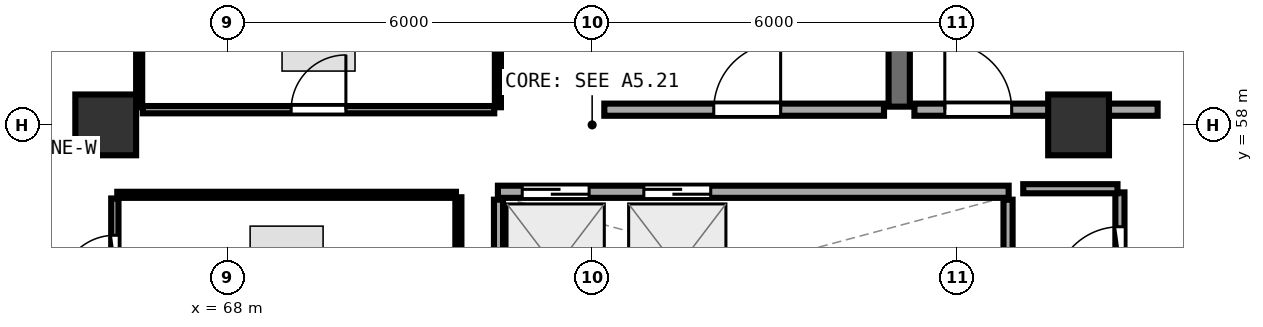
"""IFC4 building model, lengths in metres.
Left out: names, types, materials, properties, quantities, classifications, styles, units other than length and angle.
Written with IfcOpenShell. Run it as: python <this file> out.ifc"""

import sys

from ifc_helpers import new_model, si_unit, direction, frame, frame_2d, origin, origin_2d, place, context, subcontext, project, spatial, rectangle, extrude, element, fill, save


model = new_model("IFC4")
c1 = context("Model", 3, precision=1e-05, world=origin(), true_north=direction((0.0, 1.0)))
c2 = subcontext(c1, "Body", "Model", "MODEL_VIEW")
j1 = project(units=[si_unit("LENGTHUNIT", "METRE"), si_unit("PLANEANGLEUNIT", "RADIAN")], contexts=[c1])
p1 = place(None, origin())
s1 = spatial("IfcSite", under=j1, at=p1, CompositionType="ELEMENT")
p2 = place(p1, origin())
s2 = spatial("IfcBuilding", under=s1, at=p2, CompositionType="ELEMENT")
p3 = place(p2, frame((0.0, 0.0, 256.2)))
s3 = spatial("IfcBuildingStorey", under=s2, at=p3, CompositionType="ELEMENT", Elevation=256.2)
for number, where, z_axis, x_axis in (
    (1, (82.0, 58.0, 0.0), (0.0, 0.0, 1.0), (1.0, 0.0, 0.0)),
    (2, (66.0, 58.0, 0.0), (0.0, 0.0, 1.0), (1.0, 0.0, 0.0)),
):
    element("IfcColumn", number, at=place(p3, frame(where, z_axis=z_axis, x_axis=x_axis)), inside=s3, PredefinedType="PILASTER", context=c2, shape_type="SweptSolid", body=[
        extrude(rectangle(XDim=1.0, YDim=1.0, at=origin_2d()), origin(), (0.0, 0.0, 1.0), 3.75),
    ])
p4 = place(p3, frame((79.05, 58.3, 0.0), z_axis=(0.0, 0.0, 1.0), x_axis=(0.0, 1.0, 0.0)))
e3 = element("IfcWall", 3, at=p4, inside=s3, PredefinedType="SHEAR", context=c2, shape_type="SweptSolid", body=[
    extrude(rectangle(XDim=6.3, YDim=0.35, at=frame_2d((3.15, 0.0))), origin(), (0.0, 0.0, 1.0), 3.49),
])
p5 = place(p3, frame((74.2, 58.25, 0.0), z_axis=(0.0, 0.0, 1.0), x_axis=(1.0, 0.0, 0.0)))
e4 = element("IfcWall", 4, at=p5, inside=s3, PredefinedType="SOLIDWALL", context=c2, shape_type="SweptSolid", body=[
    extrude(rectangle(XDim=4.6, YDim=0.2, at=frame_2d((2.3, 0.0))), origin(), (0.0, 0.0, 1.0), 3.48),
])
p6 = place(p5, frame((1.8, 0.0, 0.0)))
e5 = element("IfcOpeningElement", 5, at=p6, cuts=e4, PredefinedType="OPENING", context=c2, shape_type="SweptSolid", body=[
    extrude(rectangle(XDim=1.1, YDim=2.1, at=frame_2d((0.55, 1.05))), frame((0.0, 0.11, 0.0), z_axis=(0.0, -1.0, 0.0), x_axis=(1.0, 0.0, 0.0)), (0.0, 0.0, 1.0), 0.22),
])
p7 = place(p3, frame((79.3, 58.25, 0.0), z_axis=(0.0, 0.0, 1.0), x_axis=(1.0, 0.0, 0.0)))
e6 = element("IfcWall", 6, at=p7, inside=s3, PredefinedType="SOLIDWALL", context=c2, shape_type="SweptSolid", body=[
    extrude(rectangle(XDim=4.0, YDim=0.2, at=frame_2d((2.0, 0.0))), origin(), (0.0, 0.0, 1.0), 2.775),
])
p8 = place(p7, frame((0.5, 0.0, 0.0)))
e7 = element("IfcOpeningElement", 7, at=p8, cuts=e6, PredefinedType="OPENING", context=c2, shape_type="SweptSolid", body=[
    extrude(rectangle(XDim=1.1, YDim=2.1, at=frame_2d((0.55, 1.05))), frame((0.0, 0.11, 0.0), z_axis=(0.0, -1.0, 0.0), x_axis=(1.0, 0.0, 0.0)), (0.0, 0.0, 1.0), 0.22),
])
p9 = place(p3, frame((72.45, 56.9, 0.0), z_axis=(0.0, 0.0, 1.0), x_axis=(1.0, 0.0, 0.0)))
e8 = element("IfcWall", 8, at=p9, inside=s3, PredefinedType="SOLIDWALL", context=c2, shape_type="SweptSolid", body=[
    extrude(rectangle(XDim=8.4, YDim=0.2, at=frame_2d((4.2, 0.0))), origin(), (0.0, 0.0, 1.0), 3.48),
])
p10 = place(p9, frame((0.4, 0.0, 0.0)))
e9 = element("IfcOpeningElement", 9, at=p10, cuts=e8, PredefinedType="OPENING", context=c2, shape_type="SweptSolid", body=[
    extrude(rectangle(XDim=1.1, YDim=2.1, at=frame_2d((0.55, 1.05))), frame((0.0, 0.11, 0.0), z_axis=(0.0, -1.0, 0.0), x_axis=(1.0, 0.0, 0.0)), (0.0, 0.0, 1.0), 0.22),
])
p11 = place(p9, frame((2.4, 0.0, 0.0)))
e10 = element("IfcOpeningElement", 10, at=p11, cuts=e8, PredefinedType="OPENING", context=c2, shape_type="SweptSolid", body=[
    extrude(rectangle(XDim=1.1, YDim=2.1, at=frame_2d((0.55, 1.05))), frame((0.0, 0.11, 0.0), z_axis=(0.0, -1.0, 0.0), x_axis=(1.0, 0.0, 0.0)), (0.0, 0.0, 1.0), 0.22),
])
for number, where, z_axis, x_axis in (
    (11, (72.46, 54.48, 0.0), (0.0, 0.0, 1.0), (0.0, 1.0, 0.0)),
    (12, (80.84, 54.48, 0.0), (0.0, 0.0, 1.0), (0.0, 1.0, 0.0)),
):
    element("IfcWall", number, at=place(p3, frame(where, z_axis=z_axis, x_axis=x_axis)), inside=s3, PredefinedType="PARTITIONING", context=c2, shape_type="SweptSolid", body=[
        extrude(rectangle(XDim=2.29, YDim=0.15, at=frame_2d((1.145, 0.0))), origin(), (0.0, 0.0, 1.0), 3.48),
    ])
p12 = place(p3, frame((82.68, 54.68, 0.0), z_axis=(0.0, 0.0, 1.0), x_axis=(0.0, 1.0, 0.0)))
e13 = element("IfcWall", 13, at=p12, inside=s3, PredefinedType="PARTITIONING", context=c2, shape_type="SweptSolid", body=[
    extrude(rectangle(XDim=2.21, YDim=0.15, at=frame_2d((1.105, 0.0))), origin(), (0.0, 0.0, 1.0), 3.48),
])
p13 = place(p12, frame((0.565, 0.0, 0.0)))
e14 = element("IfcOpeningElement", 14, at=p13, cuts=e13, PredefinedType="OPENING", context=c2, shape_type="SweptSolid", body=[
    extrude(rectangle(XDim=1.08, YDim=2.1, at=frame_2d((0.54, 1.05))), frame((0.0, 0.085, 0.0), z_axis=(0.0, -1.0, 0.0), x_axis=(1.0, 0.0, 0.0)), (0.0, 0.0, 1.0), 0.17),
])
p14 = place(p3, frame((66.61, 58.25, 0.0), z_axis=(0.0, 0.0, 1.0), x_axis=(1.0, 0.0, 0.0)))
e15 = element("IfcWall", 15, at=p14, inside=s3, PredefinedType="PARTITIONING", context=c2, shape_type="SweptSolid", body=[
    extrude(rectangle(XDim=5.78, YDim=0.12, at=frame_2d((2.89, 0.0))), origin(), (0.0, 0.0, 1.0), 3.48),
])
p15 = place(p14, frame((2.44, 0.0, 0.0)))
e16 = element("IfcOpeningElement", 16, at=p15, cuts=e15, PredefinedType="OPENING", context=c2, shape_type="SweptSolid", body=[
    extrude(rectangle(XDim=0.9, YDim=2.08, at=frame_2d((0.45, 1.04))), frame((0.0, 0.07, 0.0), z_axis=(0.0, -1.0, 0.0), x_axis=(1.0, 0.0, 0.0)), (0.0, 0.0, 1.0), 0.14),
])
p16 = place(p3, frame((66.15, 54.68, 0.0), z_axis=(0.0, 0.0, 1.0), x_axis=(0.0, 1.0, 0.0)))
e17 = element("IfcWall", 17, at=p16, inside=s3, PredefinedType="PARTITIONING", context=c2, shape_type="SweptSolid", body=[
    extrude(rectangle(XDim=2.11, YDim=0.12, at=frame_2d((1.055, 0.0))), origin(), (0.0, 0.0, 1.0), 2.775),
])
p17 = place(p16, frame((0.605, 0.0, 0.0)))
e18 = element("IfcOpeningElement", 18, at=p17, cuts=e17, PredefinedType="OPENING", context=c2, shape_type="SweptSolid", body=[
    extrude(rectangle(XDim=0.9, YDim=2.08, at=frame_2d((0.45, 1.04))), frame((0.0, 0.07, 0.0), z_axis=(0.0, -1.0, 0.0), x_axis=(1.0, 0.0, 0.0)), (0.0, 0.0, 1.0), 0.14),
])
p18 = place(p3, frame((82.64, 56.95, 0.0), z_axis=(0.0, 0.0, 1.0), x_axis=(-1.0, 0.0, 0.0)))
e19 = element("IfcWall", 19, at=p18, inside=s3, PredefinedType="PARTITIONING", context=c2, shape_type="SweptSolid", body=[
    extrude(rectangle(XDim=1.55, YDim=0.15, at=frame_2d((0.775, 0.0))), origin(), (0.0, 0.0, 1.0), 2.775),
])
for number, where, z_axis, x_axis in (
    (20, (72.45, 58.29, 0.0), (0.0, 0.0, 1.0), (0.0, 1.0, 0.0)),
    (21, (66.55, 60.68, 0.0), (0.0, 0.0, 1.0), (0.0, -1.0, 0.0)),
):
    element("IfcWall", number, at=place(p3, frame(where, z_axis=z_axis, x_axis=x_axis)), inside=s3, PredefinedType="PARTITIONING", context=c2, shape_type="SweptSolid", body=[
        extrude(rectangle(XDim=2.39, YDim=0.1, at=frame_2d((1.195, 0.0))), origin(), (0.0, 0.0, 1.0), 3.48),
    ])
p19 = place(p3, frame((71.8, 54.66, 0.0), z_axis=(0.0, 0.0, 1.0), x_axis=(0.0, 1.0, 0.0)))
e22 = element("IfcWall", 22, at=p19, inside=s3, PredefinedType="PARTITIONING", context=c2, shape_type="SweptSolid", body=[
    extrude(rectangle(XDim=2.15, YDim=0.1, at=frame_2d((1.075, 0.0))), origin(), (0.0, 0.0, 1.0), 3.48),
])
p20 = place(p3, frame((71.76, 56.85, 0.0), z_axis=(0.0, 0.0, 1.0), x_axis=(-1.0, 0.0, 0.0)))
e23 = element("IfcWall", 23, at=p20, inside=s3, PredefinedType="PARTITIONING", context=c2, shape_type="SweptSolid", body=[
    extrude(rectangle(XDim=5.57, YDim=0.1, at=frame_2d((2.785, 0.0))), origin(), (0.0, 0.0, 1.0), 2.775),
])
p21 = place(p6, frame((1.1, 0.0, 0.0), z_axis=(0.0, 0.0, 1.0), x_axis=(-1.0, 0.0, 0.0)))
e24 = element("IfcDoor", 24, at=p21, inside=s3, OperationType="SINGLE_SWING_LEFT", PredefinedType="DOOR", context=c2, shape_type="SweptSolid", body=[
    extrude(rectangle(XDim=1.1, YDim=2.1, at=frame_2d((0.55, 1.05))), frame((0.0, 0.025, 0.0), z_axis=(0.0, -1.0, 0.0), x_axis=(1.0, 0.0, 0.0)), (0.0, 0.0, 1.0), 0.05),
])
fill(e5, e24)
p22 = place(p8, frame((1.1, 0.0, 0.0), z_axis=(0.0, 0.0, 1.0), x_axis=(-1.0, 0.0, 0.0)))
e25 = element("IfcDoor", 25, at=p22, inside=s3, OperationType="SINGLE_SWING_RIGHT", PredefinedType="DOOR", context=c2, shape_type="SweptSolid", body=[
    extrude(rectangle(XDim=1.1, YDim=2.1, at=frame_2d((0.55, 1.05))), frame((0.0, 0.025, 0.0), z_axis=(0.0, -1.0, 0.0), x_axis=(1.0, 0.0, 0.0)), (0.0, 0.0, 1.0), 0.05),
])
fill(e7, e25)
p23 = place(p10, origin())
e26 = element("IfcDoor", 26, at=p23, inside=s3, OperationType="DOUBLE_DOOR_SLIDING", PredefinedType="DOOR", context=c2, shape_type="SweptSolid", body=[
    extrude(rectangle(XDim=1.1, YDim=2.1, at=frame_2d((0.55, 1.05))), frame((0.0, 0.025, 0.0), z_axis=(0.0, -1.0, 0.0), x_axis=(1.0, 0.0, 0.0)), (0.0, 0.0, 1.0), 0.05),
])
fill(e9, e26)
p24 = place(p11, origin())
e27 = element("IfcDoor", 27, at=p24, inside=s3, OperationType="DOUBLE_DOOR_SLIDING", PredefinedType="DOOR", context=c2, shape_type="SweptSolid", body=[
    extrude(rectangle(XDim=1.1, YDim=2.1, at=frame_2d((0.55, 1.05))), frame((0.0, 0.025, 0.0), z_axis=(0.0, -1.0, 0.0), x_axis=(1.0, 0.0, 0.0)), (0.0, 0.0, 1.0), 0.05),
])
fill(e10, e27)
p25 = place(p13, origin())
e28 = element("IfcDoor", 28, at=p25, inside=s3, OperationType="SINGLE_SWING_LEFT", PredefinedType="DOOR", context=c2, shape_type="SweptSolid", body=[
    extrude(rectangle(XDim=1.08, YDim=2.1, at=frame_2d((0.54, 1.05))), frame((0.0, 0.025, 0.0), z_axis=(0.0, -1.0, 0.0), x_axis=(1.0, 0.0, 0.0)), (0.0, 0.0, 1.0), 0.05),
])
fill(e14, e28)
p26 = place(p15, origin())
e29 = element("IfcDoor", 29, at=p26, inside=s3, OperationType="SINGLE_SWING_RIGHT", PredefinedType="DOOR", context=c2, shape_type="SweptSolid", body=[
    extrude(rectangle(XDim=0.9, YDim=2.08, at=frame_2d((0.45, 1.04))), frame((0.0, 0.025, 0.0), z_axis=(0.0, -1.0, 0.0), x_axis=(1.0, 0.0, 0.0)), (0.0, 0.0, 1.0), 0.05),
])
fill(e16, e29)
p27 = place(p17, origin())
e30 = element("IfcDoor", 30, at=p27, inside=s3, OperationType="SINGLE_SWING_LEFT", PredefinedType="DOOR", context=c2, shape_type="SweptSolid", body=[
    extrude(rectangle(XDim=0.9, YDim=2.08, at=frame_2d((0.45, 1.04))), frame((0.0, 0.025, 0.0), z_axis=(0.0, -1.0, 0.0), x_axis=(1.0, 0.0, 0.0)), (0.0, 0.0, 1.0), 0.05),
])
fill(e18, e30)
save(model, sys.argv[1])
